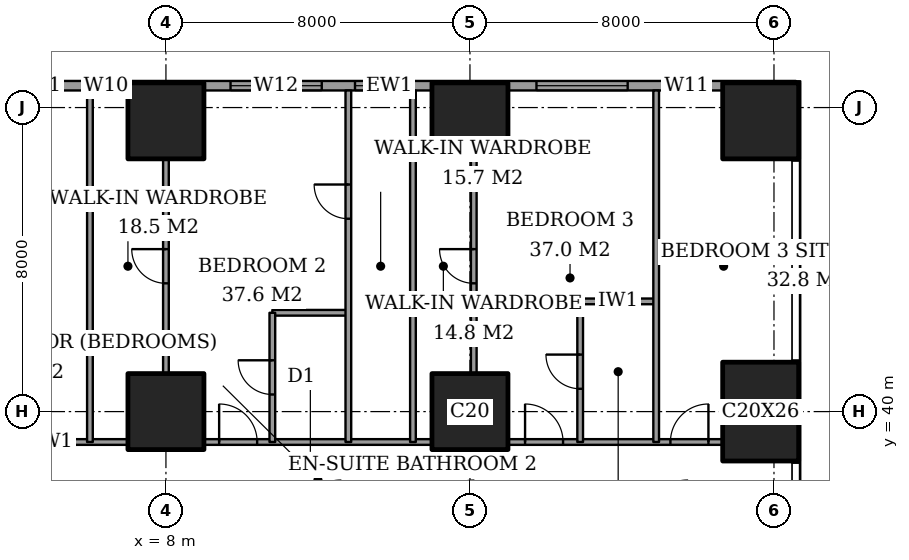
"""IFC4 building model, lengths in metres.
Left out: names, types, materials, properties, quantities, classifications, styles, units other than length and angle.
Written with IfcOpenShell. Run it as: python <this file> out.ifc"""

import sys

from ifc_helpers import new_model, si_unit, direction, frame, frame_2d, origin, origin_2d, place, context, subcontext, project, spatial, rectangle, extrude, element, fill, save


model = new_model("IFC4")
c1 = context("Model", 3, precision=1e-05, world=origin(), true_north=direction((0.0, 1.0)))
c2 = subcontext(c1, "Body", "Model", "MODEL_VIEW")
j1 = project(units=[si_unit("LENGTHUNIT", "METRE"), si_unit("PLANEANGLEUNIT", "RADIAN")], contexts=[c1])
p1 = place(None, origin())
s1 = spatial("IfcSite", under=j1, at=p1, CompositionType="ELEMENT")
p2 = place(p1, origin())
s2 = spatial("IfcBuilding", under=s1, at=p2, CompositionType="ELEMENT")
p3 = place(p2, frame((0.0, 0.0, 110.6)))
s3 = spatial("IfcBuildingStorey", under=s2, at=p3, CompositionType="ELEMENT", Elevation=110.6)
for number, where, z_axis, x_axis in (
    (1, (8.0, 40.0, 0.0), (0.0, 0.0, 1.0), (1.0, 0.0, 0.0)),
    (2, (8.0, 47.65, 0.0), (0.0, 0.0, 1.0), (1.0, 0.0, 0.0)),
    (3, (16.0, 40.0, 0.0), (0.0, 0.0, 1.0), (1.0, 0.0, 0.0)),
    (4, (16.0, 47.65, 0.0), (0.0, 0.0, 1.0), (1.0, 0.0, 0.0)),
):
    element("IfcColumn", number, at=place(p3, frame(where, z_axis=z_axis, x_axis=x_axis)), inside=s3, PredefinedType="COLUMN", context=c2, shape_type="SweptSolid", body=[
        extrude(rectangle(XDim=2.0, YDim=2.0, at=origin_2d()), origin(), (0.0, 0.0, 1.0), 3.6),
    ])
p4 = place(p3, frame((23.65, 40.0, 0.0), z_axis=(0.0, 0.0, 1.0), x_axis=(1.0, 0.0, 0.0)))
e5 = element("IfcColumn", 5, at=p4, inside=s3, PredefinedType="COLUMN", context=c2, shape_type="SweptSolid", body=[
    extrude(rectangle(XDim=2.0, YDim=2.6, at=origin_2d()), origin(), (0.0, 0.0, 1.0), 3.6),
])
p5 = place(p3, frame((23.65, 47.65, 0.0), z_axis=(0.0, 0.0, 1.0), x_axis=(1.0, 0.0, 0.0)))
e6 = element("IfcColumn", 6, at=p5, inside=s3, PredefinedType="COLUMN", context=c2, shape_type="SweptSolid", body=[
    extrude(rectangle(XDim=2.0, YDim=2.0, at=origin_2d()), origin(), (0.0, 0.0, 1.0), 3.6),
])
p6 = place(p3, frame((24.575, 48.575, 0.0), z_axis=(0.0, 0.0, 1.0), x_axis=(-1.0, 0.0, 0.0)))
e7 = element("IfcWall", 7, at=p6, inside=s3, PredefinedType="SOLIDWALL", context=c2, shape_type="SweptSolid", body=[
    extrude(rectangle(XDim=21.4, YDim=0.25, at=frame_2d((10.7, 0.0))), origin(), (0.0, 0.0, 1.0), 3.6),
])
p7 = place(p6, frame((2.275, 0.0, 0.4)))
e8 = element("IfcOpeningElement", 8, at=p7, cuts=e7, PredefinedType="OPENING", context=c2, shape_type="SweptSolid", body=[
    extrude(rectangle(XDim=1.2, YDim=2.2, at=frame_2d((0.6, 1.1))), frame((0.0, 0.135, 0.0), z_axis=(0.0, -1.0, 0.0), x_axis=(1.0, 0.0, 0.0)), (0.0, 0.0, 1.0), 0.27),
])
p8 = place(p6, frame((4.425, 0.0, 0.4)))
e9 = element("IfcOpeningElement", 9, at=p8, cuts=e7, PredefinedType="OPENING", context=c2, shape_type="SweptSolid", body=[
    extrude(rectangle(XDim=2.4, YDim=2.2, at=frame_2d((1.2, 1.1))), frame((0.0, 0.135, 0.0), z_axis=(0.0, -1.0, 0.0), x_axis=(1.0, 0.0, 0.0)), (0.0, 0.0, 1.0), 0.27),
])
p9 = place(p6, frame((10.4, 0.0, 0.4)))
e10 = element("IfcOpeningElement", 10, at=p9, cuts=e7, PredefinedType="OPENING", context=c2, shape_type="SweptSolid", body=[
    extrude(rectangle(XDim=1.2, YDim=2.2, at=frame_2d((0.6, 1.1))), frame((0.0, 0.135, 0.0), z_axis=(0.0, -1.0, 0.0), x_axis=(1.0, 0.0, 0.0)), (0.0, 0.0, 1.0), 0.27),
])
p10 = place(p6, frame((12.475, 0.0, 0.4)))
e11 = element("IfcOpeningElement", 11, at=p10, cuts=e7, PredefinedType="OPENING", context=c2, shape_type="SweptSolid", body=[
    extrude(rectangle(XDim=2.4, YDim=2.2, at=frame_2d((1.2, 1.1))), frame((0.0, 0.135, 0.0), z_axis=(0.0, -1.0, 0.0), x_axis=(1.0, 0.0, 0.0)), (0.0, 0.0, 1.0), 0.27),
])
p11 = place(p6, frame((17.85, 0.0, 0.4)))
e12 = element("IfcOpeningElement", 12, at=p11, cuts=e7, PredefinedType="OPENING", context=c2, shape_type="SweptSolid", body=[
    extrude(rectangle(XDim=0.6, YDim=2.2, at=frame_2d((0.3, 1.1))), frame((0.0, 0.135, 0.0), z_axis=(0.0, -1.0, 0.0), x_axis=(1.0, 0.0, 0.0)), (0.0, 0.0, 1.0), 0.27),
])
p12 = place(p6, frame((19.325, 0.0, 0.4)))
e13 = element("IfcOpeningElement", 13, at=p12, cuts=e7, PredefinedType="OPENING", context=c2, shape_type="SweptSolid", body=[
    extrude(rectangle(XDim=1.2, YDim=2.2, at=frame_2d((0.6, 1.1))), frame((0.0, 0.135, 0.0), z_axis=(0.0, -1.0, 0.0), x_axis=(1.0, 0.0, 0.0)), (0.0, 0.0, 1.0), 0.27),
])
p13 = place(p3, frame((1.35, 39.2, 0.0), z_axis=(0.0, 0.0, 1.0), x_axis=(1.0, 0.0, 0.0)))
e14 = element("IfcWall", 14, at=p13, inside=s3, PredefinedType="PARTITIONING", context=c2, shape_type="SweptSolid", body=[
    extrude(rectangle(XDim=5.65, YDim=0.15, at=frame_2d((2.825, 0.0))), origin(), (0.0, 0.0, 1.0), 3.35),
])
p14 = place(p13, frame((1.825, 0.0, 0.0)))
e15 = element("IfcOpeningElement", 15, at=p14, cuts=e14, PredefinedType="OPENING", context=c2, shape_type="SweptSolid", body=[
    extrude(rectangle(XDim=1.0, YDim=2.1, at=frame_2d((0.5, 1.05))), frame((0.0, 0.085, 0.0), z_axis=(0.0, -1.0, 0.0), x_axis=(1.0, 0.0, 0.0)), (0.0, 0.0, 1.0), 0.17),
])
p15 = place(p3, frame((9.0, 39.2, 0.0), z_axis=(0.0, 0.0, 1.0), x_axis=(1.0, 0.0, 0.0)))
e16 = element("IfcWall", 16, at=p15, inside=s3, PredefinedType="PARTITIONING", context=c2, shape_type="SweptSolid", body=[
    extrude(rectangle(XDim=6.0, YDim=0.15, at=frame_2d((3.0, 0.0))), origin(), (0.0, 0.0, 1.0), 3.35),
])
p16 = place(p15, frame((0.4, 0.0, 0.0)))
e17 = element("IfcOpeningElement", 17, at=p16, cuts=e16, PredefinedType="OPENING", context=c2, shape_type="SweptSolid", body=[
    extrude(rectangle(XDim=1.0, YDim=2.1, at=frame_2d((0.5, 1.05))), frame((0.0, 0.085, 0.0), z_axis=(0.0, -1.0, 0.0), x_axis=(1.0, 0.0, 0.0)), (0.0, 0.0, 1.0), 0.17),
])
p17 = place(p3, frame((17.0, 39.2, 0.0), z_axis=(0.0, 0.0, 1.0), x_axis=(1.0, 0.0, 0.0)))
e18 = element("IfcWall", 18, at=p17, inside=s3, PredefinedType="PARTITIONING", context=c2, shape_type="SweptSolid", body=[
    extrude(rectangle(XDim=5.65, YDim=0.15, at=frame_2d((2.825, 0.0))), origin(), (0.0, 0.0, 1.0), 3.35),
])
p18 = place(p17, frame((0.45, 0.0, 0.0)))
e19 = element("IfcOpeningElement", 19, at=p18, cuts=e18, PredefinedType="OPENING", context=c2, shape_type="SweptSolid", body=[
    extrude(rectangle(XDim=1.0, YDim=2.1, at=frame_2d((0.5, 1.05))), frame((0.0, 0.085, 0.0), z_axis=(0.0, -1.0, 0.0), x_axis=(1.0, 0.0, 0.0)), (0.0, 0.0, 1.0), 0.17),
])
p19 = place(p17, frame((4.275, 0.0, 0.0)))
e20 = element("IfcOpeningElement", 20, at=p19, cuts=e18, PredefinedType="OPENING", context=c2, shape_type="SweptSolid", body=[
    extrude(rectangle(XDim=1.0, YDim=2.1, at=frame_2d((0.5, 1.05))), frame((0.0, 0.085, 0.0), z_axis=(0.0, -1.0, 0.0), x_axis=(1.0, 0.0, 0.0)), (0.0, 0.0, 1.0), 0.17),
])
for number, where, z_axis, x_axis in (
    (21, (10.8, 42.6, 0.0), (0.0, 0.0, 1.0), (1.0, 0.0, 0.0)),
    (22, (18.9, 42.9, 0.0), (0.0, 0.0, 1.0), (1.0, 0.0, 0.0)),
):
    element("IfcWall", number, at=place(p3, frame(where, z_axis=z_axis, x_axis=x_axis)), inside=s3, PredefinedType="PARTITIONING", context=c2, shape_type="SweptSolid", body=[
        extrude(rectangle(XDim=2.0, YDim=0.15, at=frame_2d((1.0, 0.0))), origin(), (0.0, 0.0, 1.0), 3.35),
    ])
p20 = place(p3, frame((6.0, 39.2, 0.0), z_axis=(0.0, 0.0, 1.0), x_axis=(0.0, 1.0, 0.0)))
e23 = element("IfcWall", 23, at=p20, inside=s3, PredefinedType="PARTITIONING", context=c2, shape_type="SweptSolid", body=[
    extrude(rectangle(XDim=9.25, YDim=0.15, at=frame_2d((4.625, 0.0))), origin(), (0.0, 0.0, 1.0), 3.35),
])
p21 = place(p3, frame((8.0, 41.0, 0.0), z_axis=(0.0, 0.0, 1.0), x_axis=(0.0, 1.0, 0.0)))
e24 = element("IfcWall", 24, at=p21, inside=s3, PredefinedType="PARTITIONING", context=c2, shape_type="SweptSolid", body=[
    extrude(rectangle(XDim=5.65, YDim=0.15, at=frame_2d((2.825, 0.0))), origin(), (0.0, 0.0, 1.0), 3.35),
])
p22 = place(p21, frame((2.375, 0.0, 0.0)))
e25 = element("IfcOpeningElement", 25, at=p22, cuts=e24, PredefinedType="OPENING", context=c2, shape_type="SweptSolid", body=[
    extrude(rectangle(XDim=0.9, YDim=2.1, at=frame_2d((0.45, 1.05))), frame((0.0, 0.085, 0.0), z_axis=(0.0, -1.0, 0.0), x_axis=(1.0, 0.0, 0.0)), (0.0, 0.0, 1.0), 0.17),
])
p23 = place(p3, frame((10.8, 39.2, 0.0), z_axis=(0.0, 0.0, 1.0), x_axis=(0.0, 1.0, 0.0)))
e26 = element("IfcWall", 26, at=p23, inside=s3, PredefinedType="PARTITIONING", context=c2, shape_type="SweptSolid", body=[
    extrude(rectangle(XDim=3.4, YDim=0.15, at=frame_2d((1.7, 0.0))), origin(), (0.0, 0.0, 1.0), 3.35),
])
p24 = place(p23, frame((1.25, 0.0, 0.0)))
e27 = element("IfcOpeningElement", 27, at=p24, cuts=e26, PredefinedType="OPENING", context=c2, shape_type="SweptSolid", body=[
    extrude(rectangle(XDim=0.9, YDim=2.1, at=frame_2d((0.45, 1.05))), frame((0.0, 0.085, 0.0), z_axis=(0.0, -1.0, 0.0), x_axis=(1.0, 0.0, 0.0)), (0.0, 0.0, 1.0), 0.17),
])
p25 = place(p3, frame((12.8, 39.2, 0.0), z_axis=(0.0, 0.0, 1.0), x_axis=(0.0, 1.0, 0.0)))
e28 = element("IfcWall", 28, at=p25, inside=s3, PredefinedType="PARTITIONING", context=c2, shape_type="SweptSolid", body=[
    extrude(rectangle(XDim=9.25, YDim=0.15, at=frame_2d((4.625, 0.0))), origin(), (0.0, 0.0, 1.0), 3.35),
])
p26 = place(p25, frame((5.875, 0.0, 0.0)))
e29 = element("IfcOpeningElement", 29, at=p26, cuts=e28, PredefinedType="OPENING", context=c2, shape_type="SweptSolid", body=[
    extrude(rectangle(XDim=0.9, YDim=2.1, at=frame_2d((0.45, 1.05))), frame((0.0, 0.085, 0.0), z_axis=(0.0, -1.0, 0.0), x_axis=(1.0, 0.0, 0.0)), (0.0, 0.0, 1.0), 0.17),
])
p27 = place(p3, frame((14.5, 39.2, 0.0), z_axis=(0.0, 0.0, 1.0), x_axis=(0.0, 1.0, 0.0)))
e30 = element("IfcWall", 30, at=p27, inside=s3, PredefinedType="PARTITIONING", context=c2, shape_type="SweptSolid", body=[
    extrude(rectangle(XDim=9.25, YDim=0.15, at=frame_2d((4.625, 0.0))), origin(), (0.0, 0.0, 1.0), 3.35),
])
p28 = place(p3, frame((16.1, 41.0, 0.0), z_axis=(0.0, 0.0, 1.0), x_axis=(0.0, 1.0, 0.0)))
e31 = element("IfcWall", 31, at=p28, inside=s3, PredefinedType="PARTITIONING", context=c2, shape_type="SweptSolid", body=[
    extrude(rectangle(XDim=5.65, YDim=0.15, at=frame_2d((2.825, 0.0))), origin(), (0.0, 0.0, 1.0), 3.35),
])
p29 = place(p28, frame((2.375, 0.0, 0.0)))
e32 = element("IfcOpeningElement", 32, at=p29, cuts=e31, PredefinedType="OPENING", context=c2, shape_type="SweptSolid", body=[
    extrude(rectangle(XDim=0.9, YDim=2.1, at=frame_2d((0.45, 1.05))), frame((0.0, 0.085, 0.0), z_axis=(0.0, -1.0, 0.0), x_axis=(1.0, 0.0, 0.0)), (0.0, 0.0, 1.0), 0.17),
])
p30 = place(p3, frame((18.9, 39.2, 0.0), z_axis=(0.0, 0.0, 1.0), x_axis=(0.0, 1.0, 0.0)))
e33 = element("IfcWall", 33, at=p30, inside=s3, PredefinedType="PARTITIONING", context=c2, shape_type="SweptSolid", body=[
    extrude(rectangle(XDim=3.7, YDim=0.15, at=frame_2d((1.85, 0.0))), origin(), (0.0, 0.0, 1.0), 3.35),
])
p31 = place(p30, frame((1.4, 0.0, 0.0)))
e34 = element("IfcOpeningElement", 34, at=p31, cuts=e33, PredefinedType="OPENING", context=c2, shape_type="SweptSolid", body=[
    extrude(rectangle(XDim=0.9, YDim=2.1, at=frame_2d((0.45, 1.05))), frame((0.0, 0.085, 0.0), z_axis=(0.0, -1.0, 0.0), x_axis=(1.0, 0.0, 0.0)), (0.0, 0.0, 1.0), 0.17),
])
p32 = place(p3, frame((20.9, 39.2, 0.0), z_axis=(0.0, 0.0, 1.0), x_axis=(0.0, 1.0, 0.0)))
e35 = element("IfcWall", 35, at=p32, inside=s3, PredefinedType="PARTITIONING", context=c2, shape_type="SweptSolid", body=[
    extrude(rectangle(XDim=9.25, YDim=0.15, at=frame_2d((4.625, 0.0))), origin(), (0.0, 0.0, 1.0), 3.35),
])
p33 = place(p7, origin())
e36 = element("IfcWindow", 36, at=p33, inside=s3, PartitioningType="SINGLE_PANEL", PredefinedType="WINDOW", context=c2, shape_type="SweptSolid", body=[
    extrude(rectangle(XDim=1.2, YDim=2.2, at=frame_2d((0.6, 1.1))), frame((0.0, 0.03, 0.0), z_axis=(0.0, -1.0, 0.0), x_axis=(1.0, 0.0, 0.0)), (0.0, 0.0, 1.0), 0.06),
])
fill(e8, e36)
p34 = place(p8, origin())
e37 = element("IfcWindow", 37, at=p34, inside=s3, PartitioningType="SINGLE_PANEL", PredefinedType="WINDOW", context=c2, shape_type="SweptSolid", body=[
    extrude(rectangle(XDim=2.4, YDim=2.2, at=frame_2d((1.2, 1.1))), frame((0.0, 0.03, 0.0), z_axis=(0.0, -1.0, 0.0), x_axis=(1.0, 0.0, 0.0)), (0.0, 0.0, 1.0), 0.06),
])
fill(e9, e37)
p35 = place(p9, origin())
e38 = element("IfcWindow", 38, at=p35, inside=s3, PartitioningType="SINGLE_PANEL", PredefinedType="WINDOW", context=c2, shape_type="SweptSolid", body=[
    extrude(rectangle(XDim=1.2, YDim=2.2, at=frame_2d((0.6, 1.1))), frame((0.0, 0.03, 0.0), z_axis=(0.0, -1.0, 0.0), x_axis=(1.0, 0.0, 0.0)), (0.0, 0.0, 1.0), 0.06),
])
fill(e10, e38)
p36 = place(p10, origin())
e39 = element("IfcWindow", 39, at=p36, inside=s3, PartitioningType="SINGLE_PANEL", PredefinedType="WINDOW", context=c2, shape_type="SweptSolid", body=[
    extrude(rectangle(XDim=2.4, YDim=2.2, at=frame_2d((1.2, 1.1))), frame((0.0, 0.03, 0.0), z_axis=(0.0, -1.0, 0.0), x_axis=(1.0, 0.0, 0.0)), (0.0, 0.0, 1.0), 0.06),
])
fill(e11, e39)
p37 = place(p11, origin())
e40 = element("IfcWindow", 40, at=p37, inside=s3, PartitioningType="SINGLE_PANEL", PredefinedType="WINDOW", context=c2, shape_type="SweptSolid", body=[
    extrude(rectangle(XDim=0.6, YDim=2.2, at=frame_2d((0.3, 1.1))), frame((0.0, 0.03, 0.0), z_axis=(0.0, -1.0, 0.0), x_axis=(1.0, 0.0, 0.0)), (0.0, 0.0, 1.0), 0.06),
])
fill(e12, e40)
p38 = place(p12, origin())
e41 = element("IfcWindow", 41, at=p38, inside=s3, PartitioningType="SINGLE_PANEL", PredefinedType="WINDOW", context=c2, shape_type="SweptSolid", body=[
    extrude(rectangle(XDim=1.2, YDim=2.2, at=frame_2d((0.6, 1.1))), frame((0.0, 0.03, 0.0), z_axis=(0.0, -1.0, 0.0), x_axis=(1.0, 0.0, 0.0)), (0.0, 0.0, 1.0), 0.06),
])
fill(e13, e41)
p39 = place(p22, origin())
e42 = element("IfcDoor", 42, at=p39, inside=s3, OperationType="SINGLE_SWING_LEFT", PredefinedType="DOOR", context=c2, shape_type="SweptSolid", body=[
    extrude(rectangle(XDim=0.9, YDim=2.1, at=frame_2d((0.45, 1.05))), frame((0.0, 0.025, 0.0), z_axis=(0.0, -1.0, 0.0), x_axis=(1.0, 0.0, 0.0)), (0.0, 0.0, 1.0), 0.05),
])
fill(e25, e42)
p40 = place(p24, origin())
e43 = element("IfcDoor", 43, at=p40, inside=s3, OperationType="SINGLE_SWING_LEFT", PredefinedType="DOOR", context=c2, shape_type="SweptSolid", body=[
    extrude(rectangle(XDim=0.9, YDim=2.1, at=frame_2d((0.45, 1.05))), frame((0.0, 0.025, 0.0), z_axis=(0.0, -1.0, 0.0), x_axis=(1.0, 0.0, 0.0)), (0.0, 0.0, 1.0), 0.05),
])
fill(e27, e43)
p41 = place(p16, origin())
e44 = element("IfcDoor", 44, at=p41, inside=s3, OperationType="SINGLE_SWING_RIGHT", PredefinedType="DOOR", context=c2, shape_type="SweptSolid", body=[
    extrude(rectangle(XDim=1.0, YDim=2.1, at=frame_2d((0.5, 1.05))), frame((0.0, 0.025, 0.0), z_axis=(0.0, -1.0, 0.0), x_axis=(1.0, 0.0, 0.0)), (0.0, 0.0, 1.0), 0.05),
])
fill(e17, e44)
p42 = place(p26, origin())
e45 = element("IfcDoor", 45, at=p42, inside=s3, OperationType="SINGLE_SWING_LEFT", PredefinedType="DOOR", context=c2, shape_type="SweptSolid", body=[
    extrude(rectangle(XDim=0.9, YDim=2.1, at=frame_2d((0.45, 1.05))), frame((0.0, 0.025, 0.0), z_axis=(0.0, -1.0, 0.0), x_axis=(1.0, 0.0, 0.0)), (0.0, 0.0, 1.0), 0.05),
])
fill(e29, e45)
p43 = place(p29, origin())
e46 = element("IfcDoor", 46, at=p43, inside=s3, OperationType="SINGLE_SWING_LEFT", PredefinedType="DOOR", context=c2, shape_type="SweptSolid", body=[
    extrude(rectangle(XDim=0.9, YDim=2.1, at=frame_2d((0.45, 1.05))), frame((0.0, 0.025, 0.0), z_axis=(0.0, -1.0, 0.0), x_axis=(1.0, 0.0, 0.0)), (0.0, 0.0, 1.0), 0.05),
])
fill(e32, e46)
p44 = place(p31, origin())
e47 = element("IfcDoor", 47, at=p44, inside=s3, OperationType="SINGLE_SWING_LEFT", PredefinedType="DOOR", context=c2, shape_type="SweptSolid", body=[
    extrude(rectangle(XDim=0.9, YDim=2.1, at=frame_2d((0.45, 1.05))), frame((0.0, 0.025, 0.0), z_axis=(0.0, -1.0, 0.0), x_axis=(1.0, 0.0, 0.0)), (0.0, 0.0, 1.0), 0.05),
])
fill(e34, e47)
p45 = place(p18, origin())
e48 = element("IfcDoor", 48, at=p45, inside=s3, OperationType="SINGLE_SWING_RIGHT", PredefinedType="DOOR", context=c2, shape_type="SweptSolid", body=[
    extrude(rectangle(XDim=1.0, YDim=2.1, at=frame_2d((0.5, 1.05))), frame((0.0, 0.025, 0.0), z_axis=(0.0, -1.0, 0.0), x_axis=(1.0, 0.0, 0.0)), (0.0, 0.0, 1.0), 0.05),
])
fill(e19, e48)
p46 = place(p19, origin())
e49 = element("IfcDoor", 49, at=p46, inside=s3, OperationType="SINGLE_SWING_LEFT", PredefinedType="DOOR", context=c2, shape_type="SweptSolid", body=[
    extrude(rectangle(XDim=1.0, YDim=2.1, at=frame_2d((0.5, 1.05))), frame((0.0, 0.025, 0.0), z_axis=(0.0, -1.0, 0.0), x_axis=(1.0, 0.0, 0.0)), (0.0, 0.0, 1.0), 0.05),
])
fill(e20, e49)
save(model, sys.argv[1])
